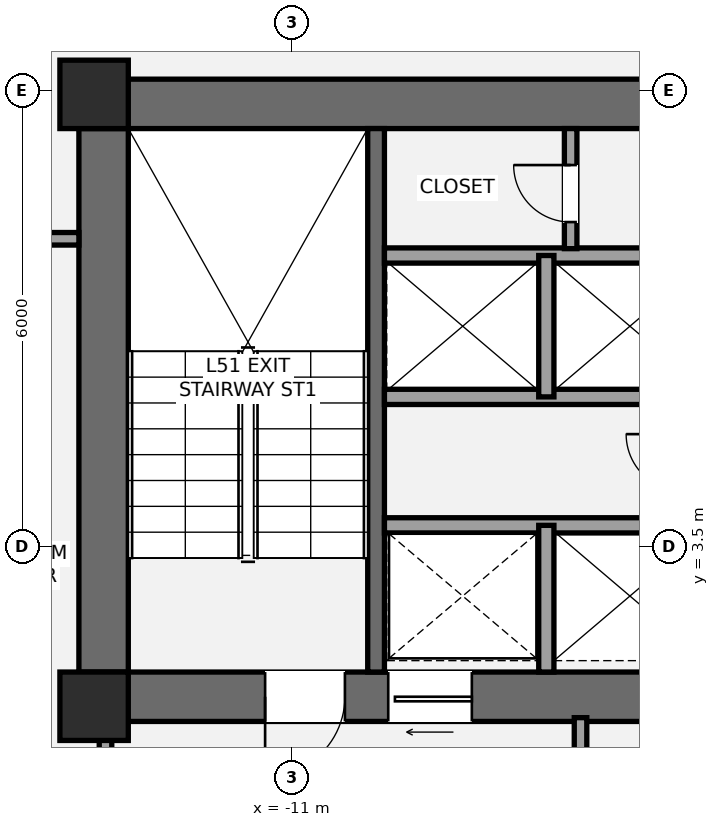
"""IFC4 building model, lengths in metres.
Left out: names, types, materials, properties, quantities, classifications, styles, units other than length and angle.
Written with IfcOpenShell. Run it as: python <this file> out.ifc"""

import sys

from ifc_helpers import new_model, si_unit, direction, frame, frame_2d, origin, origin_2d, place, context, subcontext, project, spatial, rectangle, extrude, element, fill, save


model = new_model("IFC4")
c1 = context("Model", 3, precision=1e-05, world=origin(), true_north=direction((0.0, 1.0)))
c2 = subcontext(c1, "Body", "Model", "MODEL_VIEW")
j1 = project(units=[si_unit("LENGTHUNIT", "METRE"), si_unit("PLANEANGLEUNIT", "RADIAN")], contexts=[c1])
p1 = place(None, origin())
s1 = spatial("IfcSite", under=j1, at=p1, CompositionType="ELEMENT")
p2 = place(p1, origin())
s2 = spatial("IfcBuilding", under=s1, at=p2, CompositionType="ELEMENT")
p3 = place(p2, frame((0.0, 0.0, 185.4)))
s3 = spatial("IfcBuildingStorey", under=s2, at=p3, CompositionType="ELEMENT", Elevation=185.4)
p4 = place(p3, frame((-13.475, 1.2, 0.0), z_axis=(0.0, 0.0, 1.0), x_axis=(0.0, 1.0, 0.0)))
e1 = element("IfcWall", 1, at=p4, inside=s3, PredefinedType="SHEAR", context=c2, shape_type="SweptSolid", body=[
    extrude(rectangle(XDim=8.45, YDim=0.65, at=frame_2d((4.225, 0.0))), origin(), (0.0, 0.0, 1.0), 3.2),
])
p5 = place(p3, frame((-13.8, 9.325, 0.0), z_axis=(0.0, 0.0, 1.0), x_axis=(1.0, 0.0, 0.0)))
e2 = element("IfcWall", 2, at=p5, inside=s3, PredefinedType="SHEAR", context=c2, shape_type="SweptSolid", body=[
    extrude(rectangle(XDim=9.325, YDim=0.65, at=frame_2d((4.663, 0.0))), origin(), (0.0, 0.0, 1.0), 3.2),
])
p6 = place(p3, frame((-4.875, 1.525, 0.0), z_axis=(0.0, 0.0, 1.0), x_axis=(-1.0, 0.0, 0.0)))
e3 = element("IfcWall", 3, at=p6, inside=s3, PredefinedType="SHEAR", context=c2, shape_type="SweptSolid", body=[
    extrude(rectangle(XDim=8.925, YDim=0.65, at=frame_2d((4.462, 0.0))), origin(), (0.0, 0.0, 1.0), 3.2),
])
p7 = place(p6, frame((5.425, 0.0, 0.0)))
e4 = element("IfcOpeningElement", 4, at=p7, cuts=e3, PredefinedType="OPENING", context=c2, shape_type="SweptSolid", body=[
    extrude(rectangle(XDim=1.05, YDim=2.15, at=frame_2d((0.525, 1.075))), frame((0.0, 0.335, 0.0), z_axis=(0.0, -1.0, 0.0), x_axis=(1.0, 0.0, 0.0)), (0.0, 0.0, 1.0), 0.67),
])
p8 = place(p6, frame((3.755, 0.0, 0.0)))
e5 = element("IfcOpeningElement", 5, at=p8, cuts=e3, PredefinedType="OPENING", context=c2, shape_type="SweptSolid", body=[
    extrude(rectangle(XDim=1.1, YDim=2.2, at=frame_2d((0.55, 1.1))), frame((0.0, 0.335, 0.0), z_axis=(0.0, -1.0, 0.0), x_axis=(1.0, 0.0, 0.0)), (0.0, 0.0, 1.0), 0.67),
])
p9 = place(p3, frame((-9.89, 1.85, 0.0), z_axis=(0.0, 0.0, 1.0), x_axis=(0.0, 1.0, 0.0)))
e6 = element("IfcWall", 6, at=p9, inside=s3, PredefinedType="SHEAR", context=c2, shape_type="SweptSolid", body=[
    extrude(rectangle(XDim=7.15, YDim=0.22, at=frame_2d((3.575, 0.0))), origin(), (0.0, 0.0, 1.0), 3.2),
])
for number, where, z_axis, x_axis in (
    (7, (-13.6, 1.4, 0.0), (0.0, 0.0, 1.0), (1.0, 0.0, 0.0)),
    (8, (-13.6, 9.45, 0.0), (0.0, 0.0, 1.0), (1.0, 0.0, 0.0)),
):
    element("IfcColumn", number, at=place(p3, frame(where, z_axis=z_axis, x_axis=x_axis)), inside=s3, PredefinedType="COLUMN", context=c2, shape_type="SweptSolid", body=[
        extrude(rectangle(XDim=0.9, YDim=0.9, at=origin_2d()), origin(), (0.0, 0.0, 1.0), 3.2),
    ])
p10 = place(p3, frame((-13.45, -2.15, 0.0), z_axis=(0.0, 0.0, 1.0), x_axis=(0.0, 1.0, 0.0)))
e9 = element("IfcWall", 9, at=p10, inside=s3, PredefinedType="PARTITIONING", context=c2, shape_type="SweptSolid", body=[
    extrude(rectangle(XDim=3.4, YDim=0.165, at=frame_2d((1.7, 0.0))), origin(), (0.0, 0.0, 1.0), 2.473),
])
p11 = place(p10, frame((1.15, 0.0, 0.0)))
e10 = element("IfcOpeningElement", 10, at=p11, cuts=e9, PredefinedType="OPENING", context=c2, shape_type="SweptSolid", body=[
    extrude(rectangle(XDim=1.05, YDim=2.15, at=frame_2d((0.525, 1.075))), frame((0.0, 0.093, 0.0), z_axis=(0.0, -1.0, 0.0), x_axis=(1.0, 0.0, 0.0)), (0.0, 0.0, 1.0), 0.185),
])
p12 = place(p3, frame((-7.2, -2.15, 0.0), z_axis=(0.0, 0.0, 1.0), x_axis=(0.0, 1.0, 0.0)))
e11 = element("IfcWall", 11, at=p12, inside=s3, PredefinedType="PARTITIONING", context=c2, shape_type="SweptSolid", body=[
    extrude(rectangle(XDim=3.4, YDim=0.165, at=frame_2d((1.7, 0.0))), origin(), (0.0, 0.0, 1.0), 2.473),
])
p13 = place(p3, frame((-9.78, 3.78, 0.0), z_axis=(0.0, 0.0, 1.0), x_axis=(1.0, 0.0, 0.0)))
e12 = element("IfcWall", 12, at=p13, inside=s3, PredefinedType="SOLIDWALL", context=c2, shape_type="SweptSolid", body=[
    extrude(rectangle(XDim=4.255, YDim=0.2, at=frame_2d((2.127, 0.0))), origin(), (0.0, 0.0, 1.0), 3.02),
])
p14 = place(p3, frame((-7.65, 1.85, 0.0), z_axis=(0.0, 0.0, 1.0), x_axis=(0.0, 1.0, 0.0)))
e13 = element("IfcWall", 13, at=p14, inside=s3, PredefinedType="SOLIDWALL", context=c2, shape_type="SweptSolid", body=[
    extrude(rectangle(XDim=1.93, YDim=0.2, at=frame_2d((0.965, 0.0))), origin(), (0.0, 0.0, 1.0), 3.02),
])
for number, where, z_axis, x_axis in (
    (14, (-9.78, 5.47, 0.0), (0.0, 0.0, 1.0), (1.0, 0.0, 0.0)),
    (15, (-9.78, 7.33, 0.0), (0.0, 0.0, 1.0), (1.0, 0.0, 0.0)),
):
    element("IfcWall", number, at=place(p3, frame(where, z_axis=z_axis, x_axis=x_axis)), inside=s3, PredefinedType="SOLIDWALL", context=c2, shape_type="SweptSolid", body=[
        extrude(rectangle(XDim=4.255, YDim=0.2, at=frame_2d((2.127, 0.0))), origin(), (0.0, 0.0, 1.0), 3.02),
    ])
p15 = place(p3, frame((-7.65, 5.47, 0.0), z_axis=(0.0, 0.0, 1.0), x_axis=(0.0, 1.0, 0.0)))
e16 = element("IfcWall", 16, at=p15, inside=s3, PredefinedType="SOLIDWALL", context=c2, shape_type="SweptSolid", body=[
    extrude(rectangle(XDim=1.86, YDim=0.2, at=frame_2d((0.93, 0.0))), origin(), (0.0, 0.0, 1.0), 3.02),
])
p16 = place(p3, frame((-7.33, 7.42, 0.0), z_axis=(0.0, 0.0, 1.0), x_axis=(0.0, 1.0, 0.0)))
e17 = element("IfcWall", 17, at=p16, inside=s3, PredefinedType="PARTITIONING", context=c2, shape_type="SweptSolid", body=[
    extrude(rectangle(XDim=1.58, YDim=0.165, at=frame_2d((0.79, 0.0))), origin(), (0.0, 0.0, 1.0), 3.02),
])
p17 = place(p16, frame((0.35, 0.0, 0.0)))
e18 = element("IfcOpeningElement", 18, at=p17, cuts=e17, PredefinedType="OPENING", context=c2, shape_type="SweptSolid", body=[
    extrude(rectangle(XDim=0.75, YDim=2.1, at=frame_2d((0.375, 1.05))), frame((0.0, 0.093, 0.0), z_axis=(0.0, -1.0, 0.0), x_axis=(1.0, 0.0, 0.0)), (0.0, 0.0, 1.0), 0.185),
])
p18 = place(p3, frame((-16.1, 7.55, 0.0), z_axis=(0.0, 0.0, 1.0), x_axis=(1.0, 0.0, 0.0)))
e19 = element("IfcWall", 19, at=p18, inside=s3, PredefinedType="PARTITIONING", context=c2, shape_type="SweptSolid", body=[
    extrude(rectangle(XDim=2.3, YDim=0.165, at=frame_2d((1.15, 0.0))), origin(), (0.0, 0.0, 1.0), 2.473),
])
p19 = place(p18, frame((0.3, 0.0, 0.0)))
e20 = element("IfcOpeningElement", 20, at=p19, cuts=e19, PredefinedType="OPENING", context=c2, shape_type="SweptSolid", body=[
    extrude(rectangle(XDim=1.0, YDim=2.15, at=frame_2d((0.5, 1.075))), frame((0.0, 0.093, 0.0), z_axis=(0.0, -1.0, 0.0), x_axis=(1.0, 0.0, 0.0)), (0.0, 0.0, 1.0), 0.185),
])
p20 = place(p7, origin())
e21 = element("IfcDoor", 21, at=p20, inside=s3, OperationType="SINGLE_SWING_RIGHT", PredefinedType="DOOR", context=c2, shape_type="SweptSolid", body=[
    extrude(rectangle(XDim=1.05, YDim=2.15, at=frame_2d((0.525, 1.075))), frame((0.0, 0.025, 0.0), z_axis=(0.0, -1.0, 0.0), x_axis=(1.0, 0.0, 0.0)), (0.0, 0.0, 1.0), 0.05),
])
fill(e4, e21)
p21 = place(p8, origin())
e22 = element("IfcDoor", 22, at=p21, inside=s3, OperationType="SLIDING_TO_LEFT", PredefinedType="DOOR", context=c2, shape_type="SweptSolid", body=[
    extrude(rectangle(XDim=1.1, YDim=2.2, at=frame_2d((0.55, 1.1))), frame((0.0, 0.025, 0.0), z_axis=(0.0, -1.0, 0.0), x_axis=(1.0, 0.0, 0.0)), (0.0, 0.0, 1.0), 0.05),
])
fill(e5, e22)
p22 = place(p17, origin())
e23 = element("IfcDoor", 23, at=p22, inside=s3, OperationType="SINGLE_SWING_RIGHT", PredefinedType="DOOR", context=c2, shape_type="SweptSolid", body=[
    extrude(rectangle(XDim=0.75, YDim=2.1, at=frame_2d((0.375, 1.05))), frame((0.0, 0.025, 0.0), z_axis=(0.0, -1.0, 0.0), x_axis=(1.0, 0.0, 0.0)), (0.0, 0.0, 1.0), 0.05),
])
fill(e18, e23)
save(model, sys.argv[1])
